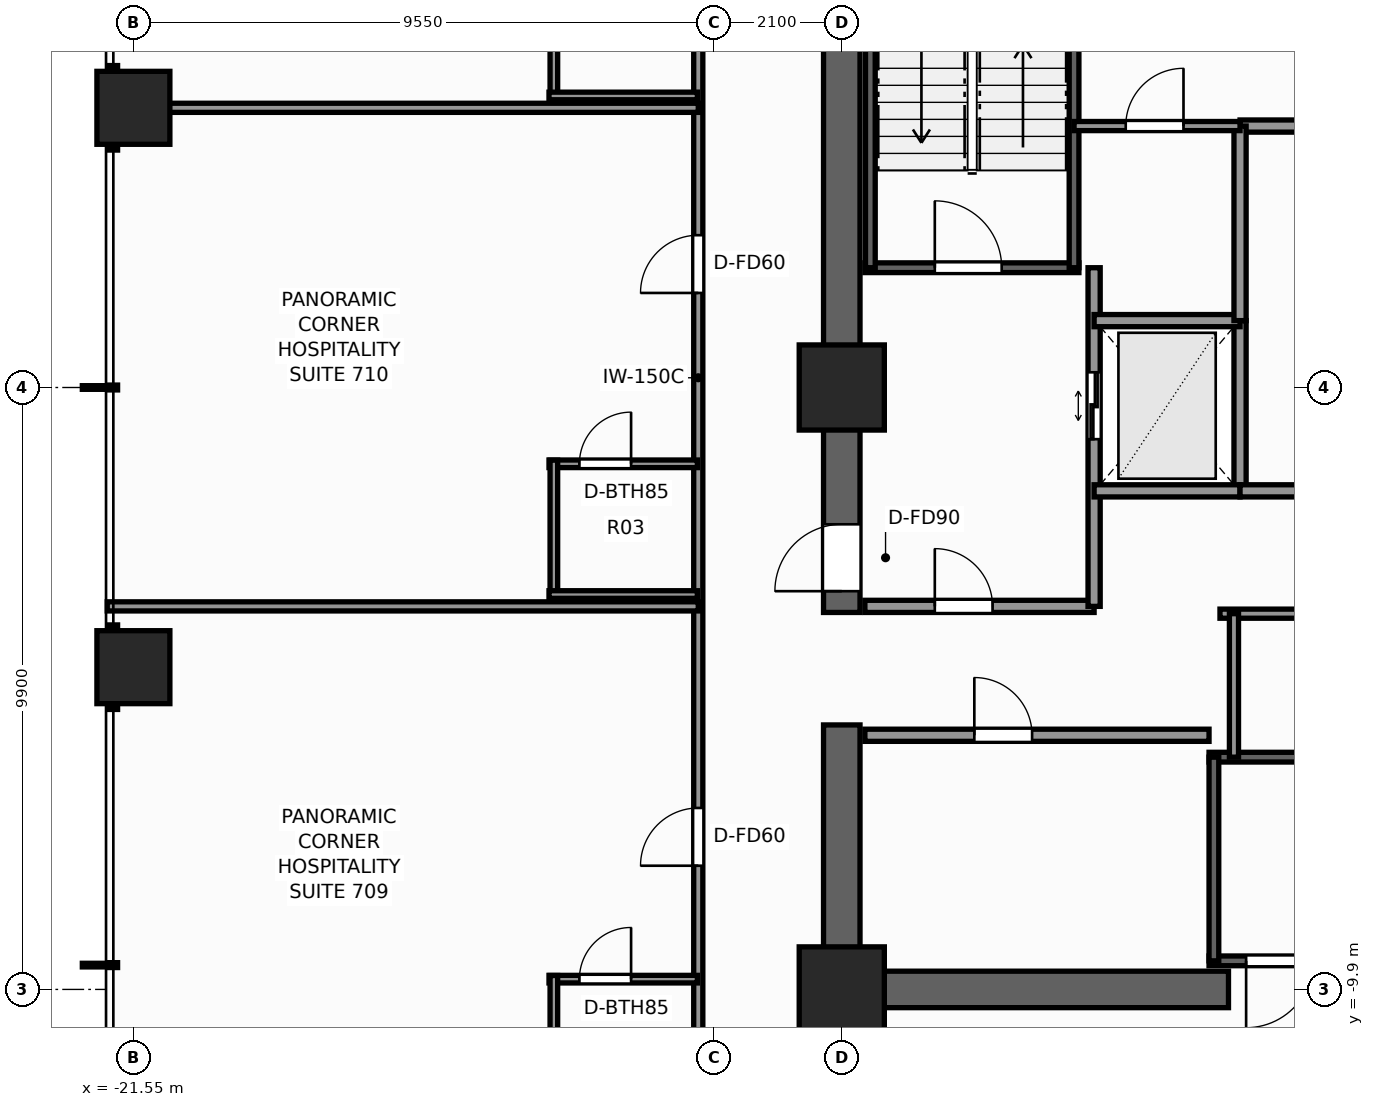
"""IFC4 building model, lengths in metres.
Left out: names, types, materials, properties, quantities, classifications, styles, units other than length and angle.
Written with IfcOpenShell. Run it as: python <this file> out.ifc"""

import sys

from ifc_helpers import new_model, si_unit, direction, frame, frame_2d, origin, origin_2d, place, context, subcontext, project, spatial, rectangle, extrude, element, fill, save


model = new_model("IFC4")
c1 = context("Model", 3, precision=1e-05, world=origin(), true_north=direction((0.0, 1.0)))
c2 = subcontext(c1, "Body", "Model", "MODEL_VIEW")
j1 = project(units=[si_unit("LENGTHUNIT", "METRE"), si_unit("PLANEANGLEUNIT", "RADIAN")], contexts=[c1])
p1 = place(None, origin())
s1 = spatial("IfcSite", under=j1, at=p1, CompositionType="ELEMENT")
p2 = place(p1, origin())
s2 = spatial("IfcBuilding", under=s1, at=p2, CompositionType="ELEMENT")
p3 = place(p2, frame((0.0, 0.0, 27.1)))
s3 = spatial("IfcBuildingStorey", under=s2, at=p3, CompositionType="ELEMENT", Elevation=27.1)
p4 = place(p3, frame((-3.54, -9.9, 0.0), z_axis=(0.0, 0.0, 1.0), x_axis=(-1.0, 0.0, 0.0)))
e1 = element("IfcWall", 1, at=p4, inside=s3, PredefinedType="SHEAR", context=c2, shape_type="SweptSolid", body=[
    extrude(rectangle(XDim=6.66, YDim=0.6, at=frame_2d((3.33, 0.0))), origin(), (0.0, 0.0, 1.0), 3.3),
])
p5 = place(p3, frame((-9.9, -9.6, 0.0), z_axis=(0.0, 0.0, 1.0), x_axis=(0.0, 1.0, 0.0)))
e2 = element("IfcWall", 2, at=p5, inside=s3, PredefinedType="SHEAR", context=c2, shape_type="SweptSolid", body=[
    extrude(rectangle(XDim=4.05, YDim=0.6, at=frame_2d((2.025, 0.0))), origin(), (0.0, 0.0, 1.0), 3.3),
])
p6 = place(p3, frame((-9.9, -3.7, 0.0), z_axis=(0.0, 0.0, 1.0), x_axis=(0.0, 1.0, 0.0)))
e3 = element("IfcWall", 3, at=p6, inside=s3, PredefinedType="SHEAR", context=c2, shape_type="SweptSolid", body=[
    extrude(rectangle(XDim=13.3, YDim=0.6, at=frame_2d((6.65, 0.0))), origin(), (0.0, 0.0, 1.0), 3.3),
])
p7 = place(p6, frame((0.35, 0.0, 0.0)))
e4 = element("IfcOpeningElement", 4, at=p7, cuts=e3, PredefinedType="OPENING", context=c2, shape_type="SweptSolid", body=[
    extrude(rectangle(XDim=1.1, YDim=2.2, at=frame_2d((0.55, 1.1))), frame((0.0, 0.31, 0.0), z_axis=(0.0, -1.0, 0.0), x_axis=(1.0, 0.0, 0.0)), (0.0, 0.0, 1.0), 0.62),
])
for number, where, z_axis, x_axis in (
    (5, (-9.9, -9.9, 0.0), (0.0, 0.0, 1.0), (1.0, 0.0, 0.0)),
    (6, (-9.9, 0.0, 0.0), (0.0, 0.0, 1.0), (1.0, 0.0, 0.0)),
):
    element("IfcColumn", number, at=place(p3, frame(where, z_axis=z_axis, x_axis=x_axis)), inside=s3, PredefinedType="COLUMN", context=c2, shape_type="SweptSolid", body=[
        extrude(rectangle(XDim=1.4, YDim=1.4, at=origin_2d()), origin(), (0.0, 0.0, 1.0), 3.3),
    ])
for number, where, z_axis, x_axis in (
    (7, (-21.55, -4.6, 0.0), (0.0, 0.0, 1.0), (1.0, 0.0, 0.0)),
    (8, (-21.55, 4.6, 0.0), (0.0, 0.0, 1.0), (1.0, 0.0, 0.0)),
):
    element("IfcColumn", number, at=place(p3, frame(where, z_axis=z_axis, x_axis=x_axis)), inside=s3, PredefinedType="COLUMN", context=c2, shape_type="SweptSolid", body=[
        extrude(rectangle(XDim=1.2, YDim=1.2, at=origin_2d()), origin(), (0.0, 0.0, 1.0), 3.3),
    ])
p8 = place(p3, frame((-9.52, 1.97, 0.0), z_axis=(0.0, 0.0, 1.0), x_axis=(1.0, 0.0, 0.0)))
e9 = element("IfcWall", 9, at=p8, inside=s3, PredefinedType="SHEAR", context=c2, shape_type="SweptSolid", body=[
    extrude(rectangle(XDim=3.52, YDim=0.16, at=frame_2d((1.76, 0.0))), origin(), (0.0, 0.0, 1.0), 3.3),
])
p9 = place(p8, frame((1.15, 0.0, 0.0)))
e10 = element("IfcOpeningElement", 10, at=p9, cuts=e9, PredefinedType="OPENING", context=c2, shape_type="SweptSolid", body=[
    extrude(rectangle(XDim=1.1, YDim=2.2, at=frame_2d((0.55, 1.1))), frame((0.0, 0.09, 0.0), z_axis=(0.0, -1.0, 0.0), x_axis=(1.0, 0.0, 0.0)), (0.0, 0.0, 1.0), 0.18),
])
for number, where, z_axis, x_axis in (
    (11, (-9.43, 1.97, 0.0), (0.0, 0.0, 1.0), (0.0, 1.0, 0.0)),
    (12, (-6.08, 1.97, 0.0), (0.0, 0.0, 1.0), (0.0, 1.0, 0.0)),
):
    element("IfcWall", number, at=place(p3, frame(where, z_axis=z_axis, x_axis=x_axis)), inside=s3, PredefinedType="SHEAR", context=c2, shape_type="SweptSolid", body=[
        extrude(rectangle(XDim=7.56, YDim=0.16, at=frame_2d((3.78, 0.0))), origin(), (0.0, 0.0, 1.0), 3.3),
    ])
p10 = place(p3, frame((3.86, -9.43, 0.0), z_axis=(0.0, 0.0, 1.0), x_axis=(-1.0, 0.0, 0.0)))
e13 = element("IfcWall", 13, at=p10, inside=s3, PredefinedType="SHEAR", context=c2, shape_type="SweptSolid", body=[
    extrude(rectangle(XDim=7.72, YDim=0.16, at=frame_2d((3.86, 0.0))), origin(), (0.0, 0.0, 1.0), 3.3),
])
p11 = place(p10, frame((6.01, 0.0, 0.0)))
e14 = element("IfcOpeningElement", 14, at=p11, cuts=e13, PredefinedType="OPENING", context=c2, shape_type="SweptSolid", body=[
    extrude(rectangle(XDim=1.1, YDim=2.2, at=frame_2d((0.55, 1.1))), frame((0.0, 0.09, 0.0), z_axis=(0.0, -1.0, 0.0), x_axis=(1.0, 0.0, 0.0)), (0.0, 0.0, 1.0), 0.18),
])
p12 = place(p3, frame((-3.86, -6.08, 0.0), z_axis=(0.0, 0.0, 1.0), x_axis=(1.0, 0.0, 0.0)))
e15 = element("IfcWall", 15, at=p12, inside=s3, PredefinedType="SHEAR", context=c2, shape_type="SweptSolid", body=[
    extrude(rectangle(XDim=7.72, YDim=0.16, at=frame_2d((3.86, 0.0))), origin(), (0.0, 0.0, 1.0), 3.3),
])
p13 = place(p3, frame((-3.78, -9.43, 0.0), z_axis=(0.0, 0.0, 1.0), x_axis=(0.0, 1.0, 0.0)))
e16 = element("IfcWall", 16, at=p13, inside=s3, PredefinedType="SHEAR", context=c2, shape_type="SweptSolid", body=[
    extrude(rectangle(XDim=3.35, YDim=0.16, at=frame_2d((1.675, 0.0))), origin(), (0.0, 0.0, 1.0), 3.3),
])
p14 = place(p3, frame((-9.52, -3.6, 0.0), z_axis=(0.0, 0.0, 1.0), x_axis=(1.0, 0.0, 0.0)))
e17 = element("IfcWall", 17, at=p14, inside=s3, PredefinedType="SOLIDWALL", context=c2, shape_type="SweptSolid", body=[
    extrude(rectangle(XDim=3.77, YDim=0.2, at=frame_2d((1.885, 0.0))), origin(), (0.0, 0.0, 1.0), 3.06),
])
p15 = place(p14, frame((1.15, 0.0, 0.0)))
e18 = element("IfcOpeningElement", 18, at=p15, cuts=e17, PredefinedType="OPENING", context=c2, shape_type="SweptSolid", body=[
    extrude(rectangle(XDim=0.95, YDim=2.06, at=frame_2d((0.475, 1.03))), frame((0.0, 0.11, 0.0), z_axis=(0.0, -1.0, 0.0), x_axis=(1.0, 0.0, 0.0)), (0.0, 0.0, 1.0), 0.22),
])
p16 = place(p3, frame((-5.75, -3.6, 0.0), z_axis=(0.0, 0.0, 1.0), x_axis=(0.0, 1.0, 0.0)))
e19 = element("IfcWall", 19, at=p16, inside=s3, PredefinedType="SOLIDWALL", context=c2, shape_type="SweptSolid", body=[
    extrude(rectangle(XDim=5.57, YDim=0.2, at=frame_2d((2.785, 0.0))), origin(), (0.0, 0.0, 1.0), 3.06),
])
p17 = place(p16, frame((2.75, 0.0, 0.0)))
e20 = element("IfcOpeningElement", 20, at=p17, cuts=e19, PredefinedType="OPENING", context=c2, shape_type="SweptSolid", body=[
    extrude(rectangle(XDim=1.1, YDim=2.2, at=frame_2d((0.55, 1.1))), frame((0.0, 0.11, 0.0), z_axis=(0.0, -1.0, 0.0), x_axis=(1.0, 0.0, 0.0)), (0.0, 0.0, 1.0), 0.22),
])
p18 = place(p3, frame((-3.35, -1.7, 0.0), z_axis=(0.0, 0.0, 1.0), x_axis=(0.0, 1.0, 0.0)))
e21 = element("IfcWall", 21, at=p18, inside=s3, PredefinedType="SOLIDWALL", context=c2, shape_type="SweptSolid", body=[
    extrude(rectangle(XDim=2.8, YDim=0.2, at=frame_2d((1.4, 0.0))), origin(), (0.0, 0.0, 1.0), 3.06),
])
for number, where, z_axis, x_axis in (
    (22, (-5.75, -1.7, 0.0), (0.0, 0.0, 1.0), (1.0, 0.0, 0.0)),
    (23, (-5.75, 1.1, 0.0), (0.0, 0.0, 1.0), (1.0, 0.0, 0.0)),
):
    element("IfcWall", number, at=place(p3, frame(where, z_axis=z_axis, x_axis=x_axis)), inside=s3, PredefinedType="SOLIDWALL", context=c2, shape_type="SweptSolid", body=[
        extrude(rectangle(XDim=2.4, YDim=0.2, at=frame_2d((1.2, 0.0))), origin(), (0.0, 0.0, 1.0), 3.06),
    ])
p19 = place(p3, frame((-9.52, -5.72, 0.0), z_axis=(0.0, 0.0, 1.0), x_axis=(1.0, 0.0, 0.0)))
e24 = element("IfcWall", 24, at=p19, inside=s3, PredefinedType="SOLIDWALL", context=c2, shape_type="SweptSolid", body=[
    extrude(rectangle(XDim=5.66, YDim=0.2, at=frame_2d((2.83, 0.0))), origin(), (0.0, 0.0, 1.0), 3.06),
])
p20 = place(p19, frame((1.8, 0.0, 0.0)))
e25 = element("IfcOpeningElement", 25, at=p20, cuts=e24, PredefinedType="OPENING", context=c2, shape_type="SweptSolid", body=[
    extrude(rectangle(XDim=0.95, YDim=2.06, at=frame_2d((0.475, 1.03))), frame((0.0, 0.11, 0.0), z_axis=(0.0, -1.0, 0.0), x_axis=(1.0, 0.0, 0.0)), (0.0, 0.0, 1.0), 0.22),
])
p21 = place(p3, frame((-3.35, 4.3, 0.0), z_axis=(0.0, 0.0, 1.0), x_axis=(1.0, 0.0, 0.0)))
e26 = element("IfcWall", 26, at=p21, inside=s3, PredefinedType="SOLIDWALL", context=c2, shape_type="SweptSolid", body=[
    extrude(rectangle(XDim=6.7, YDim=0.2, at=frame_2d((3.35, 0.0))), origin(), (0.0, 0.0, 1.0), 3.06),
])
p22 = place(p21, frame((4.35, 0.0, 0.0)))
e27 = element("IfcOpeningElement", 27, at=p22, cuts=e26, PredefinedType="OPENING", context=c2, shape_type="SweptSolid", body=[
    extrude(rectangle(XDim=0.95, YDim=2.06, at=frame_2d((0.475, 1.03))), frame((0.0, 0.11, 0.0), z_axis=(0.0, -1.0, 0.0), x_axis=(1.0, 0.0, 0.0)), (0.0, 0.0, 1.0), 0.22),
])
p23 = place(p3, frame((-3.35, -1.7, 0.0), z_axis=(0.0, 0.0, 1.0), x_axis=(1.0, 0.0, 0.0)))
e28 = element("IfcWall", 28, at=p23, inside=s3, PredefinedType="SOLIDWALL", context=c2, shape_type="SweptSolid", body=[
    extrude(rectangle(XDim=6.7, YDim=0.2, at=frame_2d((3.35, 0.0))), origin(), (0.0, 0.0, 1.0), 3.06),
])
p24 = place(p3, frame((-3.35, 1.1, 0.0), z_axis=(0.0, 0.0, 1.0), x_axis=(0.0, 1.0, 0.0)))
e29 = element("IfcWall", 29, at=p24, inside=s3, PredefinedType="SOLIDWALL", context=c2, shape_type="SweptSolid", body=[
    extrude(rectangle(XDim=3.2, YDim=0.2, at=frame_2d((1.6, 0.0))), origin(), (0.0, 0.0, 1.0), 3.06),
])
p25 = place(p3, frame((-3.68, -3.72, 0.0), z_axis=(0.0, 0.0, 1.0), x_axis=(1.0, 0.0, 0.0)))
e30 = element("IfcWall", 30, at=p25, inside=s3, PredefinedType="PARTITIONING", context=c2, shape_type="SweptSolid", body=[
    extrude(rectangle(XDim=7.36, YDim=0.15, at=frame_2d((3.68, 0.0))), origin(), (0.0, 0.0, 1.0), 3.06),
])
p26 = place(p3, frame((-3.45, -6.08, 0.0), z_axis=(0.0, 0.0, 1.0), x_axis=(0.0, 1.0, 0.0)))
e31 = element("IfcWall", 31, at=p26, inside=s3, PredefinedType="PARTITIONING", context=c2, shape_type="SweptSolid", body=[
    extrude(rectangle(XDim=2.36, YDim=0.15, at=frame_2d((1.18, 0.0))), origin(), (0.0, 0.0, 1.0), 3.06),
])
p27 = place(p3, frame((-6.08, 4.3, 0.0), z_axis=(0.0, 0.0, 1.0), x_axis=(1.0, 0.0, 0.0)))
e32 = element("IfcWall", 32, at=p27, inside=s3, PredefinedType="PARTITIONING", context=c2, shape_type="SweptSolid", body=[
    extrude(rectangle(XDim=2.73, YDim=0.15, at=frame_2d((1.365, 0.0))), origin(), (0.0, 0.0, 1.0), 3.06),
])
p28 = place(p27, frame((0.85, 0.0, 0.0)))
e33 = element("IfcOpeningElement", 33, at=p28, cuts=e32, PredefinedType="OPENING", context=c2, shape_type="SweptSolid", body=[
    extrude(rectangle(XDim=0.95, YDim=2.06, at=frame_2d((0.475, 1.03))), frame((0.0, 0.085, 0.0), z_axis=(0.0, -1.0, 0.0), x_axis=(1.0, 0.0, 0.0)), (0.0, 0.0, 1.0), 0.17),
])
p29 = place(p3, frame((-12.26, -12.26, 0.0), z_axis=(0.0, 0.0, 1.0), x_axis=(0.0, 1.0, 0.0)))
e34 = element("IfcWall", 34, at=p29, inside=s3, PredefinedType="PARTITIONING", context=c2, shape_type="SweptSolid", body=[
    extrude(rectangle(XDim=24.84, YDim=0.15, at=frame_2d((12.42, 0.0))), origin(), (0.0, 0.0, 1.0), 2.272),
])
p30 = place(p29, frame((4.395, 0.0, 0.0)))
e35 = element("IfcOpeningElement", 35, at=p30, cuts=e34, PredefinedType="OPENING", context=c2, shape_type="SweptSolid", body=[
    extrude(rectangle(XDim=0.95, YDim=2.06, at=frame_2d((0.475, 1.03))), frame((0.0, 0.085, 0.0), z_axis=(0.0, -1.0, 0.0), x_axis=(1.0, 0.0, 0.0)), (0.0, 0.0, 1.0), 0.17),
])
p31 = place(p29, frame((13.815, 0.0, 0.0)))
e36 = element("IfcOpeningElement", 36, at=p31, cuts=e34, PredefinedType="OPENING", context=c2, shape_type="SweptSolid", body=[
    extrude(rectangle(XDim=0.95, YDim=2.06, at=frame_2d((0.475, 1.03))), frame((0.0, 0.085, 0.0), z_axis=(0.0, -1.0, 0.0), x_axis=(1.0, 0.0, 0.0)), (0.0, 0.0, 1.0), 0.17),
])
p32 = place(p29, frame((20.268, 0.0, 0.0)))
e37 = element("IfcOpeningElement", 37, at=p32, cuts=e34, PredefinedType="OPENING", context=c2, shape_type="SweptSolid", body=[
    extrude(rectangle(XDim=0.95, YDim=2.06, at=frame_2d((0.475, 1.03))), frame((0.0, 0.085, 0.0), z_axis=(0.0, -1.0, 0.0), x_axis=(1.0, 0.0, 0.0)), (0.0, 0.0, 1.0), 0.17),
])
p33 = place(p3, frame((-21.98, -3.6, 0.0), z_axis=(0.0, 0.0, 1.0), x_axis=(1.0, 0.0, 0.0)))
e38 = element("IfcWall", 38, at=p33, inside=s3, PredefinedType="PARTITIONING", context=c2, shape_type="SweptSolid", body=[
    extrude(rectangle(XDim=9.72, YDim=0.15, at=frame_2d((4.86, 0.0))), origin(), (0.0, 0.0, 1.0), 2.429),
])
p34 = place(p3, frame((-14.715, -9.731, 0.0), z_axis=(0.0, 0.0, 1.0), x_axis=(1.0, 0.0, 0.0)))
e39 = element("IfcWall", 39, at=p34, inside=s3, PredefinedType="PARTITIONING", context=c2, shape_type="SweptSolid", body=[
    extrude(rectangle(XDim=2.44, YDim=0.125, at=frame_2d((1.22, 0.0))), origin(), (0.0, 0.0, 1.0), 3.06),
])
p35 = place(p34, frame((0.5, 0.0, 0.0)))
e40 = element("IfcOpeningElement", 40, at=p35, cuts=e39, PredefinedType="OPENING", context=c2, shape_type="SweptSolid", body=[
    extrude(rectangle(XDim=0.85, YDim=2.03, at=frame_2d((0.425, 1.015))), frame((0.0, 0.073, 0.0), z_axis=(0.0, -1.0, 0.0), x_axis=(1.0, 0.0, 0.0)), (0.0, 0.0, 1.0), 0.145),
])
p36 = place(p3, frame((-14.635, -11.941, 0.0), z_axis=(0.0, 0.0, 1.0), x_axis=(0.0, 1.0, 0.0)))
e41 = element("IfcWall", 41, at=p36, inside=s3, PredefinedType="PARTITIONING", context=c2, shape_type="SweptSolid", body=[
    extrude(rectangle(XDim=2.27, YDim=0.125, at=frame_2d((1.135, 0.0))), origin(), (0.0, 0.0, 1.0), 2.272),
])
p37 = place(p3, frame((-21.98, 4.6, 0.0), z_axis=(0.0, 0.0, 1.0), x_axis=(1.0, 0.0, 0.0)))
e42 = element("IfcWall", 42, at=p37, inside=s3, PredefinedType="PARTITIONING", context=c2, shape_type="SweptSolid", body=[
    extrude(rectangle(XDim=9.72, YDim=0.15, at=frame_2d((4.86, 0.0))), origin(), (0.0, 0.0, 1.0), 2.272),
])
p38 = place(p3, frame((-14.715, -1.255, 0.0), z_axis=(0.0, 0.0, 1.0), x_axis=(1.0, 0.0, 0.0)))
e43 = element("IfcWall", 43, at=p38, inside=s3, PredefinedType="PARTITIONING", context=c2, shape_type="SweptSolid", body=[
    extrude(rectangle(XDim=2.44, YDim=0.125, at=frame_2d((1.22, 0.0))), origin(), (0.0, 0.0, 1.0), 3.06),
])
p39 = place(p38, frame((0.5, 0.0, 0.0)))
e44 = element("IfcOpeningElement", 44, at=p39, cuts=e43, PredefinedType="OPENING", context=c2, shape_type="SweptSolid", body=[
    extrude(rectangle(XDim=0.85, YDim=2.03, at=frame_2d((0.425, 1.015))), frame((0.0, 0.073, 0.0), z_axis=(0.0, -1.0, 0.0), x_axis=(1.0, 0.0, 0.0)), (0.0, 0.0, 1.0), 0.145),
])
p40 = place(p3, frame((-14.635, -3.465, 0.0), z_axis=(0.0, 0.0, 1.0), x_axis=(0.0, 1.0, 0.0)))
e45 = element("IfcWall", 45, at=p40, inside=s3, PredefinedType="PARTITIONING", context=c2, shape_type="SweptSolid", body=[
    extrude(rectangle(XDim=2.27, YDim=0.125, at=frame_2d((1.135, 0.0))), origin(), (0.0, 0.0, 1.0), 3.06),
])
p41 = place(p3, frame((-14.715, -3.405, 0.0), z_axis=(0.0, 0.0, 1.0), x_axis=(1.0, 0.0, 0.0)))
e46 = element("IfcWall", 46, at=p41, inside=s3, PredefinedType="PARTITIONING", context=c2, shape_type="SweptSolid", body=[
    extrude(rectangle(XDim=2.44, YDim=0.125, at=frame_2d((1.22, 0.0))), origin(), (0.0, 0.0, 1.0), 3.06),
])
p42 = place(p3, frame((-14.635, 4.735, 0.0), z_axis=(0.0, 0.0, 1.0), x_axis=(0.0, 1.0, 0.0)))
e47 = element("IfcWall", 47, at=p42, inside=s3, PredefinedType="PARTITIONING", context=c2, shape_type="SweptSolid", body=[
    extrude(rectangle(XDim=2.27, YDim=0.125, at=frame_2d((1.135, 0.0))), origin(), (0.0, 0.0, 1.0), 2.272),
])
p43 = place(p3, frame((-14.715, 4.795, 0.0), z_axis=(0.0, 0.0, 1.0), x_axis=(1.0, 0.0, 0.0)))
e48 = element("IfcWall", 48, at=p43, inside=s3, PredefinedType="PARTITIONING", context=c2, shape_type="SweptSolid", body=[
    extrude(rectangle(XDim=2.44, YDim=0.125, at=frame_2d((1.22, 0.0))), origin(), (0.0, 0.0, 1.0), 2.272),
])
p44 = place(p9, origin())
e49 = element("IfcDoor", 49, at=p44, inside=s3, OperationType="SINGLE_SWING_LEFT", PredefinedType="DOOR", context=c2, shape_type="SweptSolid", body=[
    extrude(rectangle(XDim=1.1, YDim=2.2, at=frame_2d((0.55, 1.1))), frame((0.0, 0.025, 0.0), z_axis=(0.0, -1.0, 0.0), x_axis=(1.0, 0.0, 0.0)), (0.0, 0.0, 1.0), 0.05),
])
fill(e10, e49)
p45 = place(p11, origin())
e50 = element("IfcDoor", 50, at=p45, inside=s3, OperationType="SINGLE_SWING_RIGHT", PredefinedType="DOOR", context=c2, shape_type="SweptSolid", body=[
    extrude(rectangle(XDim=1.1, YDim=2.2, at=frame_2d((0.55, 1.1))), frame((0.0, 0.025, 0.0), z_axis=(0.0, -1.0, 0.0), x_axis=(1.0, 0.0, 0.0)), (0.0, 0.0, 1.0), 0.05),
])
fill(e14, e50)
p46 = place(p7, origin())
e51 = element("IfcDoor", 51, at=p46, inside=s3, OperationType="SINGLE_SWING_LEFT", PredefinedType="DOOR", context=c2, shape_type="SweptSolid", body=[
    extrude(rectangle(XDim=1.1, YDim=2.2, at=frame_2d((0.55, 1.1))), frame((0.0, 0.025, 0.0), z_axis=(0.0, -1.0, 0.0), x_axis=(1.0, 0.0, 0.0)), (0.0, 0.0, 1.0), 0.05),
])
fill(e4, e51)
p47 = place(p17, origin())
e52 = element("IfcDoor", 52, at=p47, inside=s3, OperationType="DOUBLE_DOOR_SLIDING", PredefinedType="DOOR", context=c2, shape_type="SweptSolid", body=[
    extrude(rectangle(XDim=1.1, YDim=2.2, at=frame_2d((0.55, 1.1))), frame((0.0, 0.025, 0.0), z_axis=(0.0, -1.0, 0.0), x_axis=(1.0, 0.0, 0.0)), (0.0, 0.0, 1.0), 0.05),
])
fill(e20, e52)
p48 = place(p20, origin())
e53 = element("IfcDoor", 53, at=p48, inside=s3, OperationType="SINGLE_SWING_LEFT", PredefinedType="DOOR", context=c2, shape_type="SweptSolid", body=[
    extrude(rectangle(XDim=0.95, YDim=2.06, at=frame_2d((0.475, 1.03))), frame((0.0, 0.025, 0.0), z_axis=(0.0, -1.0, 0.0), x_axis=(1.0, 0.0, 0.0)), (0.0, 0.0, 1.0), 0.05),
])
fill(e25, e53)
p49 = place(p15, origin())
e54 = element("IfcDoor", 54, at=p49, inside=s3, OperationType="SINGLE_SWING_LEFT", PredefinedType="DOOR", context=c2, shape_type="SweptSolid", body=[
    extrude(rectangle(XDim=0.95, YDim=2.06, at=frame_2d((0.475, 1.03))), frame((0.0, 0.025, 0.0), z_axis=(0.0, -1.0, 0.0), x_axis=(1.0, 0.0, 0.0)), (0.0, 0.0, 1.0), 0.05),
])
fill(e18, e54)
p50 = place(p28, origin())
e55 = element("IfcDoor", 55, at=p50, inside=s3, OperationType="SINGLE_SWING_RIGHT", PredefinedType="DOOR", context=c2, shape_type="SweptSolid", body=[
    extrude(rectangle(XDim=0.95, YDim=2.06, at=frame_2d((0.475, 1.03))), frame((0.0, 0.025, 0.0), z_axis=(0.0, -1.0, 0.0), x_axis=(1.0, 0.0, 0.0)), (0.0, 0.0, 1.0), 0.05),
])
fill(e33, e55)
p51 = place(p35, origin())
e56 = element("IfcDoor", 56, at=p51, inside=s3, OperationType="SINGLE_SWING_RIGHT", PredefinedType="DOOR", context=c2, shape_type="SweptSolid", body=[
    extrude(rectangle(XDim=0.85, YDim=2.03, at=frame_2d((0.425, 1.015))), frame((0.0, 0.025, 0.0), z_axis=(0.0, -1.0, 0.0), x_axis=(1.0, 0.0, 0.0)), (0.0, 0.0, 1.0), 0.05),
])
fill(e40, e56)
p52 = place(p30, origin())
e57 = element("IfcDoor", 57, at=p52, inside=s3, OperationType="SINGLE_SWING_LEFT", PredefinedType="DOOR", context=c2, shape_type="SweptSolid", body=[
    extrude(rectangle(XDim=0.95, YDim=2.06, at=frame_2d((0.475, 1.03))), frame((0.0, 0.025, 0.0), z_axis=(0.0, -1.0, 0.0), x_axis=(1.0, 0.0, 0.0)), (0.0, 0.0, 1.0), 0.05),
])
fill(e35, e57)
p53 = place(p39, origin())
e58 = element("IfcDoor", 58, at=p53, inside=s3, OperationType="SINGLE_SWING_RIGHT", PredefinedType="DOOR", context=c2, shape_type="SweptSolid", body=[
    extrude(rectangle(XDim=0.85, YDim=2.03, at=frame_2d((0.425, 1.015))), frame((0.0, 0.025, 0.0), z_axis=(0.0, -1.0, 0.0), x_axis=(1.0, 0.0, 0.0)), (0.0, 0.0, 1.0), 0.05),
])
fill(e44, e58)
p54 = place(p31, origin())
e59 = element("IfcDoor", 59, at=p54, inside=s3, OperationType="SINGLE_SWING_LEFT", PredefinedType="DOOR", context=c2, shape_type="SweptSolid", body=[
    extrude(rectangle(XDim=0.95, YDim=2.06, at=frame_2d((0.475, 1.03))), frame((0.0, 0.025, 0.0), z_axis=(0.0, -1.0, 0.0), x_axis=(1.0, 0.0, 0.0)), (0.0, 0.0, 1.0), 0.05),
])
fill(e36, e59)
save(model, sys.argv[1])
